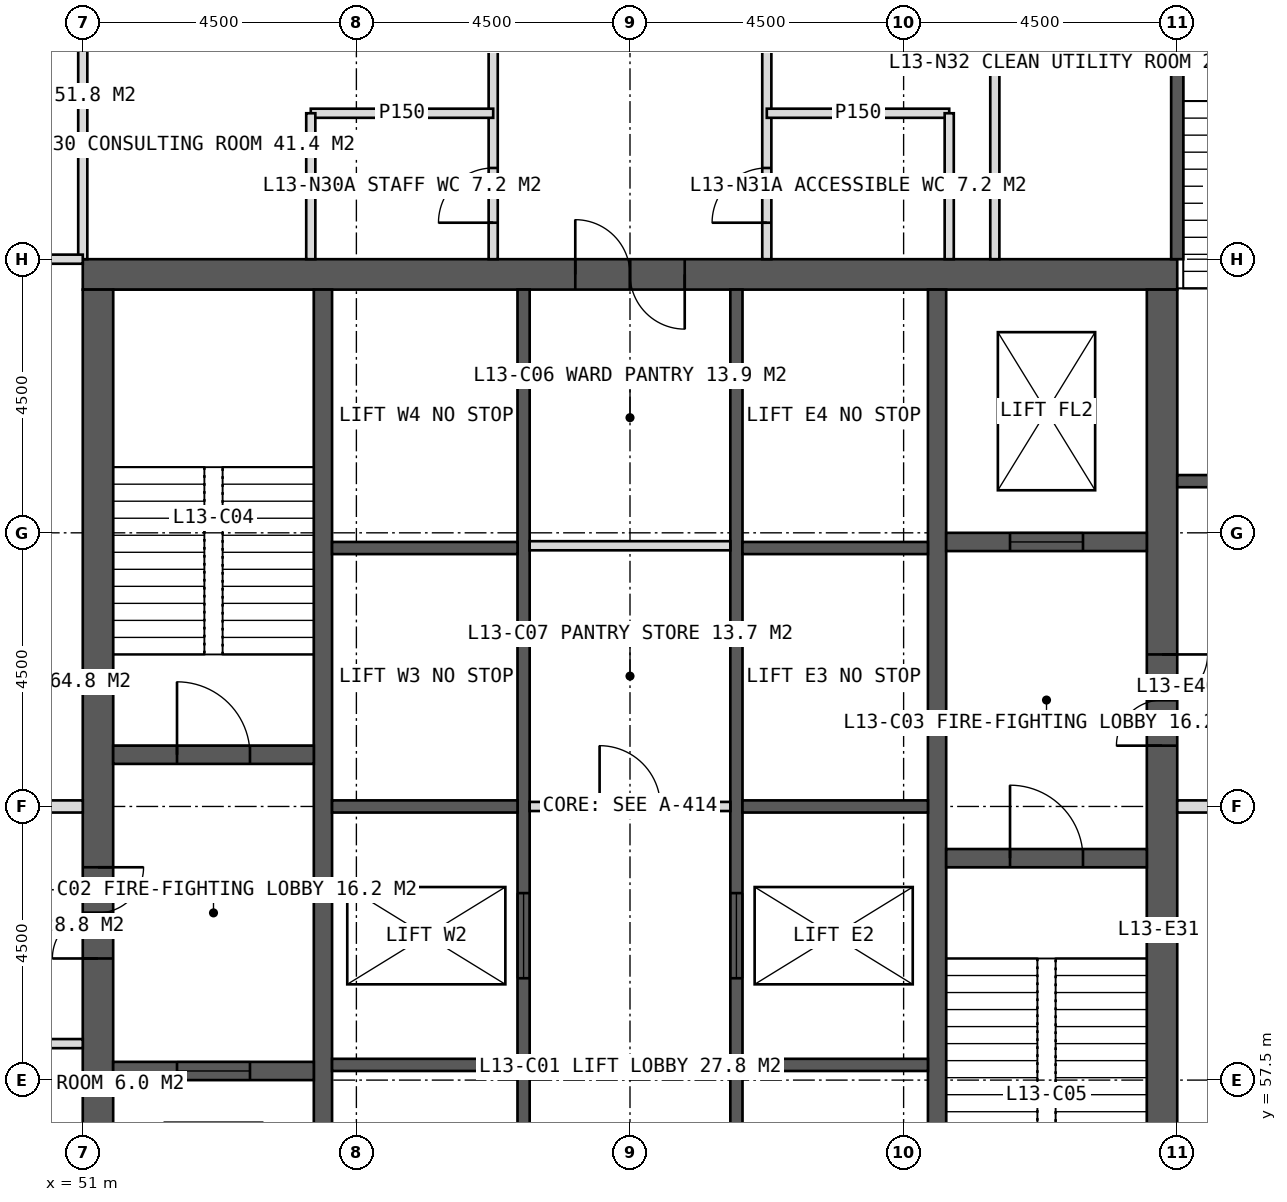
"""IFC4 building model, lengths in metres.
Left out: names, types, materials, properties, quantities, classifications, styles, units other than length and angle.
Written with IfcOpenShell. Run it as: python <this file> out.ifc"""

import sys

from ifc_helpers import new_model, si_unit, direction, frame, frame_2d, origin, place, context, subcontext, project, spatial, rectangle, extrude, element, fill, save


model = new_model("IFC4")
c1 = context("Model", 3, precision=1e-05, world=origin(), true_north=direction((0.0, 1.0)))
c2 = subcontext(c1, "Body", "Model", "MODEL_VIEW")
j1 = project(units=[si_unit("LENGTHUNIT", "METRE"), si_unit("PLANEANGLEUNIT", "RADIAN")], contexts=[c1])
p1 = place(None, origin())
s1 = spatial("IfcSite", under=j1, at=p1, CompositionType="ELEMENT")
p2 = place(p1, origin())
s2 = spatial("IfcBuilding", under=s1, at=p2, CompositionType="ELEMENT")
p3 = place(p2, frame((0.0, 0.0, 59.0)))
s3 = spatial("IfcBuildingStorey", under=s2, at=p3, CompositionType="ELEMENT", Elevation=59.0)
p4 = place(p3, frame((51.0, 70.75, 0.0), z_axis=(0.0, 0.0, 1.0), x_axis=(1.0, 0.0, 0.0)))
e1 = element("IfcWall", 1, at=p4, inside=s3, PredefinedType="SHEAR", context=c2, shape_type="SweptSolid", body=[
    extrude(rectangle(XDim=18.0, YDim=0.5, at=frame_2d((9.0, 0.0))), origin(), (0.0, 0.0, 1.0), 4.0),
])
p5 = place(p4, frame((8.1, 0.0, 0.0)))
e2 = element("IfcOpeningElement", 2, at=p5, cuts=e1, PredefinedType="OPENING", context=c2, shape_type="SweptSolid", body=[
    extrude(rectangle(XDim=1.8, YDim=2.2, at=frame_2d((0.9, 1.1))), frame((0.0, 0.26, 0.0), z_axis=(0.0, -1.0, 0.0), x_axis=(1.0, 0.0, 0.0)), (0.0, 0.0, 1.0), 0.52),
])
p6 = place(p3, frame((51.25, 53.5, 0.0), z_axis=(0.0, 0.0, 1.0), x_axis=(0.0, 1.0, 0.0)))
e3 = element("IfcWall", 3, at=p6, inside=s3, PredefinedType="SHEAR", context=c2, shape_type="SweptSolid", body=[
    extrude(rectangle(XDim=17.0, YDim=0.5, at=frame_2d((8.5, 0.0))), origin(), (0.0, 0.0, 1.0), 4.0),
])
p7 = place(p6, frame((6.0, 0.0, 0.0)))
e4 = element("IfcOpeningElement", 4, at=p7, cuts=e3, PredefinedType="OPENING", context=c2, shape_type="SweptSolid", body=[
    extrude(rectangle(XDim=1.5, YDim=2.2, at=frame_2d((0.75, 1.1))), frame((0.0, 0.26, 0.0), z_axis=(0.0, -1.0, 0.0), x_axis=(1.0, 0.0, 0.0)), (0.0, 0.0, 1.0), 0.52),
])
p8 = place(p3, frame((68.75, 53.5, 0.0), z_axis=(0.0, 0.0, 1.0), x_axis=(0.0, 1.0, 0.0)))
e5 = element("IfcWall", 5, at=p8, inside=s3, PredefinedType="SHEAR", context=c2, shape_type="SweptSolid", body=[
    extrude(rectangle(XDim=17.0, YDim=0.5, at=frame_2d((8.5, 0.0))), origin(), (0.0, 0.0, 1.0), 4.0),
])
p9 = place(p8, frame((9.5, 0.0, 0.0)))
e6 = element("IfcOpeningElement", 6, at=p9, cuts=e5, PredefinedType="OPENING", context=c2, shape_type="SweptSolid", body=[
    extrude(rectangle(XDim=1.5, YDim=2.2, at=frame_2d((0.75, 1.1))), frame((0.0, 0.26, 0.0), z_axis=(0.0, -1.0, 0.0), x_axis=(1.0, 0.0, 0.0)), (0.0, 0.0, 1.0), 0.52),
])
for number, where, z_axis, x_axis in (
    (7, (54.95, 53.5, 0.0), (0.0, 0.0, 1.0), (0.0, 1.0, 0.0)),
    (8, (65.05, 53.5, 0.0), (0.0, 0.0, 1.0), (0.0, 1.0, 0.0)),
):
    element("IfcWall", number, at=place(p3, frame(where, z_axis=z_axis, x_axis=x_axis)), inside=s3, PredefinedType="SHEAR", context=c2, shape_type="SweptSolid", body=[
        extrude(rectangle(XDim=17.0, YDim=0.3, at=frame_2d((8.5, 0.0))), origin(), (0.0, 0.0, 1.0), 4.0),
    ])
p10 = place(p3, frame((58.25, 53.5, 0.0), z_axis=(0.0, 0.0, 1.0), x_axis=(0.0, 1.0, 0.0)))
e9 = element("IfcWall", 9, at=p10, inside=s3, PredefinedType="SHEAR", context=c2, shape_type="SweptSolid", body=[
    extrude(rectangle(XDim=17.0, YDim=0.2, at=frame_2d((8.5, 0.0))), origin(), (0.0, 0.0, 1.0), 4.0),
])
p11 = place(p10, frame((1.375, 0.0, 0.0)))
e10 = element("IfcOpeningElement", 10, at=p11, cuts=e9, PredefinedType="OPENING", context=c2, shape_type="SweptSolid", body=[
    extrude(rectangle(XDim=1.4, YDim=2.2, at=frame_2d((0.7, 1.1))), frame((0.0, 0.11, 0.0), z_axis=(0.0, -1.0, 0.0), x_axis=(1.0, 0.0, 0.0)), (0.0, 0.0, 1.0), 0.22),
])
p12 = place(p10, frame((5.675, 0.0, 0.0)))
e11 = element("IfcOpeningElement", 11, at=p12, cuts=e9, PredefinedType="OPENING", context=c2, shape_type="SweptSolid", body=[
    extrude(rectangle(XDim=1.4, YDim=2.2, at=frame_2d((0.7, 1.1))), frame((0.0, 0.11, 0.0), z_axis=(0.0, -1.0, 0.0), x_axis=(1.0, 0.0, 0.0)), (0.0, 0.0, 1.0), 0.22),
])
p13 = place(p3, frame((61.75, 53.5, 0.0), z_axis=(0.0, 0.0, 1.0), x_axis=(0.0, 1.0, 0.0)))
e12 = element("IfcWall", 12, at=p13, inside=s3, PredefinedType="SHEAR", context=c2, shape_type="SweptSolid", body=[
    extrude(rectangle(XDim=17.0, YDim=0.2, at=frame_2d((8.5, 0.0))), origin(), (0.0, 0.0, 1.0), 4.0),
])
p14 = place(p13, frame((1.375, 0.0, 0.0)))
e13 = element("IfcOpeningElement", 13, at=p14, cuts=e12, PredefinedType="OPENING", context=c2, shape_type="SweptSolid", body=[
    extrude(rectangle(XDim=1.4, YDim=2.2, at=frame_2d((0.7, 1.1))), frame((0.0, 0.11, 0.0), z_axis=(0.0, -1.0, 0.0), x_axis=(1.0, 0.0, 0.0)), (0.0, 0.0, 1.0), 0.22),
])
p15 = place(p13, frame((5.675, 0.0, 0.0)))
e14 = element("IfcOpeningElement", 14, at=p15, cuts=e12, PredefinedType="OPENING", context=c2, shape_type="SweptSolid", body=[
    extrude(rectangle(XDim=1.4, YDim=2.2, at=frame_2d((0.7, 1.1))), frame((0.0, 0.11, 0.0), z_axis=(0.0, -1.0, 0.0), x_axis=(1.0, 0.0, 0.0)), (0.0, 0.0, 1.0), 0.22),
])
for number, where, z_axis, x_axis in (
    (15, (55.1, 57.75, 0.0), (0.0, 0.0, 1.0), (1.0, 0.0, 0.0)),
    (16, (61.85, 57.75, 0.0), (0.0, 0.0, 1.0), (1.0, 0.0, 0.0)),
    (17, (55.1, 62.0, 0.0), (0.0, 0.0, 1.0), (1.0, 0.0, 0.0)),
    (18, (61.85, 62.0, 0.0), (0.0, 0.0, 1.0), (1.0, 0.0, 0.0)),
    (19, (55.1, 66.25, 0.0), (0.0, 0.0, 1.0), (1.0, 0.0, 0.0)),
    (20, (61.85, 66.25, 0.0), (0.0, 0.0, 1.0), (1.0, 0.0, 0.0)),
):
    element("IfcWall", number, at=place(p3, frame(where, z_axis=z_axis, x_axis=x_axis)), inside=s3, PredefinedType="SHEAR", context=c2, shape_type="SweptSolid", body=[
        extrude(rectangle(XDim=3.05, YDim=0.2, at=frame_2d((1.525, 0.0))), origin(), (0.0, 0.0, 1.0), 4.0),
    ])
p16 = place(p3, frame((51.5, 62.85, 0.0), z_axis=(0.0, 0.0, 1.0), x_axis=(1.0, 0.0, 0.0)))
e21 = element("IfcWall", 21, at=p16, inside=s3, PredefinedType="SHEAR", context=c2, shape_type="SweptSolid", body=[
    extrude(rectangle(XDim=3.3, YDim=0.3, at=frame_2d((1.65, 0.0))), origin(), (0.0, 0.0, 1.0), 4.0),
])
p17 = place(p16, frame((1.05, 0.0, 0.0)))
e22 = element("IfcOpeningElement", 22, at=p17, cuts=e21, PredefinedType="OPENING", context=c2, shape_type="SweptSolid", body=[
    extrude(rectangle(XDim=1.2, YDim=2.1, at=frame_2d((0.6, 1.05))), frame((0.0, 0.16, 0.0), z_axis=(0.0, -1.0, 0.0), x_axis=(1.0, 0.0, 0.0)), (0.0, 0.0, 1.0), 0.32),
])
p18 = place(p3, frame((51.5, 57.65, 0.0), z_axis=(0.0, 0.0, 1.0), x_axis=(1.0, 0.0, 0.0)))
e23 = element("IfcWall", 23, at=p18, inside=s3, PredefinedType="SHEAR", context=c2, shape_type="SweptSolid", body=[
    extrude(rectangle(XDim=3.3, YDim=0.3, at=frame_2d((1.65, 0.0))), origin(), (0.0, 0.0, 1.0), 4.0),
])
p19 = place(p18, frame((1.05, 0.0, 0.0)))
e24 = element("IfcOpeningElement", 24, at=p19, cuts=e23, PredefinedType="OPENING", context=c2, shape_type="SweptSolid", body=[
    extrude(rectangle(XDim=1.2, YDim=2.2, at=frame_2d((0.6, 1.1))), frame((0.0, 0.16, 0.0), z_axis=(0.0, -1.0, 0.0), x_axis=(1.0, 0.0, 0.0)), (0.0, 0.0, 1.0), 0.32),
])
p20 = place(p3, frame((65.2, 61.15, 0.0), z_axis=(0.0, 0.0, 1.0), x_axis=(1.0, 0.0, 0.0)))
e25 = element("IfcWall", 25, at=p20, inside=s3, PredefinedType="SHEAR", context=c2, shape_type="SweptSolid", body=[
    extrude(rectangle(XDim=3.3, YDim=0.3, at=frame_2d((1.65, 0.0))), origin(), (0.0, 0.0, 1.0), 4.0),
])
p21 = place(p20, frame((1.05, 0.0, 0.0)))
e26 = element("IfcOpeningElement", 26, at=p21, cuts=e25, PredefinedType="OPENING", context=c2, shape_type="SweptSolid", body=[
    extrude(rectangle(XDim=1.2, YDim=2.1, at=frame_2d((0.6, 1.05))), frame((0.0, 0.16, 0.0), z_axis=(0.0, -1.0, 0.0), x_axis=(1.0, 0.0, 0.0)), (0.0, 0.0, 1.0), 0.32),
])
p22 = place(p3, frame((65.2, 66.35, 0.0), z_axis=(0.0, 0.0, 1.0), x_axis=(1.0, 0.0, 0.0)))
e27 = element("IfcWall", 27, at=p22, inside=s3, PredefinedType="SHEAR", context=c2, shape_type="SweptSolid", body=[
    extrude(rectangle(XDim=3.3, YDim=0.3, at=frame_2d((1.65, 0.0))), origin(), (0.0, 0.0, 1.0), 4.0),
])
p23 = place(p22, frame((1.05, 0.0, 0.0)))
e28 = element("IfcOpeningElement", 28, at=p23, cuts=e27, PredefinedType="OPENING", context=c2, shape_type="SweptSolid", body=[
    extrude(rectangle(XDim=1.2, YDim=2.2, at=frame_2d((0.6, 1.1))), frame((0.0, 0.16, 0.0), z_axis=(0.0, -1.0, 0.0), x_axis=(1.0, 0.0, 0.0)), (0.0, 0.0, 1.0), 0.32),
])
p24 = place(p3, frame((51.0, 71.0, 0.0), z_axis=(0.0, 0.0, 1.0), x_axis=(0.0, 1.0, 0.0)))
e29 = element("IfcWall", 29, at=p24, inside=s3, PredefinedType="PARTITIONING", context=c2, shape_type="SweptSolid", body=[
    extrude(rectangle(XDim=7.2, YDim=0.15, at=frame_2d((3.6, 0.0))), origin(), (0.0, 0.0, 1.0), 3.75),
])
p25 = place(p3, frame((57.75, 71.0, 0.0), z_axis=(0.0, 0.0, 1.0), x_axis=(0.0, 1.0, 0.0)))
e30 = element("IfcWall", 30, at=p25, inside=s3, PredefinedType="PARTITIONING", context=c2, shape_type="SweptSolid", body=[
    extrude(rectangle(XDim=7.2, YDim=0.15, at=frame_2d((3.6, 0.0))), origin(), (0.0, 0.0, 1.0), 3.75),
])
p26 = place(p25, frame((0.6, 0.0, 0.0)))
e31 = element("IfcOpeningElement", 31, at=p26, cuts=e30, PredefinedType="OPENING", context=c2, shape_type="SweptSolid", body=[
    extrude(rectangle(XDim=0.9, YDim=2.1, at=frame_2d((0.45, 1.05))), frame((0.0, 0.085, 0.0), z_axis=(0.0, -1.0, 0.0), x_axis=(1.0, 0.0, 0.0)), (0.0, 0.0, 1.0), 0.17),
])
p27 = place(p3, frame((62.25, 71.0, 0.0), z_axis=(0.0, 0.0, 1.0), x_axis=(0.0, 1.0, 0.0)))
e32 = element("IfcWall", 32, at=p27, inside=s3, PredefinedType="PARTITIONING", context=c2, shape_type="SweptSolid", body=[
    extrude(rectangle(XDim=7.2, YDim=0.15, at=frame_2d((3.6, 0.0))), origin(), (0.0, 0.0, 1.0), 3.75),
])
p28 = place(p27, frame((0.6, 0.0, 0.0)))
e33 = element("IfcOpeningElement", 33, at=p28, cuts=e32, PredefinedType="OPENING", context=c2, shape_type="SweptSolid", body=[
    extrude(rectangle(XDim=0.9, YDim=2.1, at=frame_2d((0.45, 1.05))), frame((0.0, 0.085, 0.0), z_axis=(0.0, -1.0, 0.0), x_axis=(1.0, 0.0, 0.0)), (0.0, 0.0, 1.0), 0.17),
])
p29 = place(p3, frame((66.0, 71.0, 0.0), z_axis=(0.0, 0.0, 1.0), x_axis=(0.0, 1.0, 0.0)))
e34 = element("IfcWall", 34, at=p29, inside=s3, PredefinedType="PARTITIONING", context=c2, shape_type="SweptSolid", body=[
    extrude(rectangle(XDim=7.2, YDim=0.15, at=frame_2d((3.6, 0.0))), origin(), (0.0, 0.0, 1.0), 3.75),
])
p30 = place(p3, frame((54.75, 73.4, 0.0), z_axis=(0.0, 0.0, 1.0), x_axis=(1.0, 0.0, 0.0)))
e35 = element("IfcWall", 35, at=p30, inside=s3, PredefinedType="PARTITIONING", context=c2, shape_type="SweptSolid", body=[
    extrude(rectangle(XDim=3.0, YDim=0.15, at=frame_2d((1.5, 0.0))), origin(), (0.0, 0.0, 1.0), 3.75),
])
p31 = place(p3, frame((54.75, 71.0, 0.0), z_axis=(0.0, 0.0, 1.0), x_axis=(0.0, 1.0, 0.0)))
e36 = element("IfcWall", 36, at=p31, inside=s3, PredefinedType="PARTITIONING", context=c2, shape_type="SweptSolid", body=[
    extrude(rectangle(XDim=2.4, YDim=0.15, at=frame_2d((1.2, 0.0))), origin(), (0.0, 0.0, 1.0), 3.75),
])
p32 = place(p3, frame((62.25, 73.4, 0.0), z_axis=(0.0, 0.0, 1.0), x_axis=(1.0, 0.0, 0.0)))
e37 = element("IfcWall", 37, at=p32, inside=s3, PredefinedType="PARTITIONING", context=c2, shape_type="SweptSolid", body=[
    extrude(rectangle(XDim=3.0, YDim=0.15, at=frame_2d((1.5, 0.0))), origin(), (0.0, 0.0, 1.0), 3.75),
])
p33 = place(p3, frame((65.25, 71.0, 0.0), z_axis=(0.0, 0.0, 1.0), x_axis=(0.0, 1.0, 0.0)))
e38 = element("IfcWall", 38, at=p33, inside=s3, PredefinedType="PARTITIONING", context=c2, shape_type="SweptSolid", body=[
    extrude(rectangle(XDim=2.4, YDim=0.15, at=frame_2d((1.2, 0.0))), origin(), (0.0, 0.0, 1.0), 3.75),
])
p34 = place(p3, frame((51.0, 58.1, 0.0), z_axis=(0.0, 0.0, 1.0), x_axis=(-1.0, 0.0, 0.0)))
e39 = element("IfcWall", 39, at=p34, inside=s3, PredefinedType="PARTITIONING", context=c2, shape_type="SweptSolid", body=[
    extrude(rectangle(XDim=7.2, YDim=0.15, at=frame_2d((3.6, 0.0))), origin(), (0.0, 0.0, 1.0), 3.75),
])
p35 = place(p34, frame((0.6, 0.0, 0.0)))
e40 = element("IfcOpeningElement", 40, at=p35, cuts=e39, PredefinedType="OPENING", context=c2, shape_type="SweptSolid", body=[
    extrude(rectangle(XDim=0.9, YDim=2.1, at=frame_2d((0.45, 1.05))), frame((0.0, 0.085, 0.0), z_axis=(0.0, -1.0, 0.0), x_axis=(1.0, 0.0, 0.0)), (0.0, 0.0, 1.0), 0.17),
])
p36 = place(p3, frame((51.0, 62.0, 0.0), z_axis=(0.0, 0.0, 1.0), x_axis=(-1.0, 0.0, 0.0)))
e41 = element("IfcWall", 41, at=p36, inside=s3, PredefinedType="SOLIDWALL", context=c2, shape_type="SweptSolid", body=[
    extrude(rectangle(XDim=7.2, YDim=0.2, at=frame_2d((3.6, 0.0))), origin(), (0.0, 0.0, 1.0), 2.75),
])
p37 = place(p3, frame((51.0, 71.0, 0.0), z_axis=(0.0, 0.0, 1.0), x_axis=(-1.0, 0.0, 0.0)))
e42 = element("IfcWall", 42, at=p37, inside=s3, PredefinedType="PARTITIONING", context=c2, shape_type="SweptSolid", body=[
    extrude(rectangle(XDim=7.2, YDim=0.15, at=frame_2d((3.6, 0.0))), origin(), (0.0, 0.0, 1.0), 3.75),
])
p38 = place(p3, frame((69.0, 62.0, 0.0), z_axis=(0.0, 0.0, 1.0), x_axis=(1.0, 0.0, 0.0)))
e43 = element("IfcWall", 43, at=p38, inside=s3, PredefinedType="SOLIDWALL", context=c2, shape_type="SweptSolid", body=[
    extrude(rectangle(XDim=7.2, YDim=0.2, at=frame_2d((3.6, 0.0))), origin(), (0.0, 0.0, 1.0), 2.75),
])
p39 = place(p3, frame((58.35, 62.0, 0.0), z_axis=(0.0, 0.0, 1.0), x_axis=(1.0, 0.0, 0.0)))
e44 = element("IfcWall", 44, at=p39, inside=s3, PredefinedType="PARTITIONING", context=c2, shape_type="SweptSolid", body=[
    extrude(rectangle(XDim=3.3, YDim=0.15, at=frame_2d((1.65, 0.0))), origin(), (0.0, 0.0, 1.0), 3.75),
])
p40 = place(p39, frame((1.15, 0.0, 0.0)))
e45 = element("IfcOpeningElement", 45, at=p40, cuts=e44, PredefinedType="OPENING", context=c2, shape_type="SweptSolid", body=[
    extrude(rectangle(XDim=1.0, YDim=2.1, at=frame_2d((0.5, 1.05))), frame((0.0, 0.085, 0.0), z_axis=(0.0, -1.0, 0.0), x_axis=(1.0, 0.0, 0.0)), (0.0, 0.0, 1.0), 0.17),
])
p41 = place(p3, frame((58.35, 66.288, 0.0), z_axis=(0.0, 0.0, 1.0), x_axis=(1.0, 0.0, 0.0)))
e46 = element("IfcWall", 46, at=p41, inside=s3, PredefinedType="PARTITIONING", context=c2, shape_type="SweptSolid", body=[
    extrude(rectangle(XDim=3.3, YDim=0.15, at=frame_2d((1.65, 0.0))), origin(), (0.0, 0.0, 1.0), 3.75),
])
p42 = place(p3, frame((69.0, 71.0, 0.0), z_axis=(0.0, 0.0, 1.0), x_axis=(0.0, 1.0, 0.0)))
e47 = element("IfcWall", 47, at=p42, inside=s3, PredefinedType="SOLIDWALL", context=c2, shape_type="SweptSolid", body=[
    extrude(rectangle(XDim=4.1, YDim=0.2, at=frame_2d((2.05, 0.0))), origin(), (0.0, 0.0, 1.0), 3.75),
])
p43 = place(p3, frame((69.0, 67.35, 0.0), z_axis=(0.0, 0.0, 1.0), x_axis=(1.0, 0.0, 0.0)))
e48 = element("IfcWall", 48, at=p43, inside=s3, PredefinedType="SOLIDWALL", context=c2, shape_type="SweptSolid", body=[
    extrude(rectangle(XDim=3.5, YDim=0.2, at=frame_2d((1.75, 0.0))), origin(), (0.0, 0.0, 1.0), 3.75),
])
p44 = place(p26, origin())
e49 = element("IfcDoor", 49, at=p44, inside=s3, OperationType="SINGLE_SWING_LEFT", PredefinedType="DOOR", context=c2, shape_type="SweptSolid", body=[
    extrude(rectangle(XDim=0.9, YDim=2.1, at=frame_2d((0.45, 1.05))), frame((0.0, 0.025, 0.0), z_axis=(0.0, -1.0, 0.0), x_axis=(1.0, 0.0, 0.0)), (0.0, 0.0, 1.0), 0.05),
])
fill(e31, e49)
p45 = place(p28, origin())
e50 = element("IfcDoor", 50, at=p45, inside=s3, OperationType="SINGLE_SWING_LEFT", PredefinedType="DOOR", context=c2, shape_type="SweptSolid", body=[
    extrude(rectangle(XDim=0.9, YDim=2.1, at=frame_2d((0.45, 1.05))), frame((0.0, 0.025, 0.0), z_axis=(0.0, -1.0, 0.0), x_axis=(1.0, 0.0, 0.0)), (0.0, 0.0, 1.0), 0.05),
])
fill(e33, e50)
p46 = place(p7, origin())
e51 = element("IfcDoor", 51, at=p46, inside=s3, OperationType="DOUBLE_DOOR_SINGLE_SWING", PredefinedType="DOOR", context=c2, shape_type="SweptSolid", body=[
    extrude(rectangle(XDim=1.5, YDim=2.2, at=frame_2d((0.75, 1.1))), frame((0.0, 0.025, 0.0), z_axis=(0.0, -1.0, 0.0), x_axis=(1.0, 0.0, 0.0)), (0.0, 0.0, 1.0), 0.05),
])
fill(e4, e51)
p47 = place(p9, origin())
e52 = element("IfcDoor", 52, at=p47, inside=s3, OperationType="DOUBLE_DOOR_SINGLE_SWING", PredefinedType="DOOR", context=c2, shape_type="SweptSolid", body=[
    extrude(rectangle(XDim=1.5, YDim=2.2, at=frame_2d((0.75, 1.1))), frame((0.0, 0.025, 0.0), z_axis=(0.0, -1.0, 0.0), x_axis=(1.0, 0.0, 0.0)), (0.0, 0.0, 1.0), 0.05),
])
fill(e6, e52)
p48 = place(p17, origin())
e53 = element("IfcDoor", 53, at=p48, inside=s3, OperationType="SINGLE_SWING_LEFT", PredefinedType="DOOR", context=c2, shape_type="SweptSolid", body=[
    extrude(rectangle(XDim=1.2, YDim=2.1, at=frame_2d((0.6, 1.05))), frame((0.0, 0.025, 0.0), z_axis=(0.0, -1.0, 0.0), x_axis=(1.0, 0.0, 0.0)), (0.0, 0.0, 1.0), 0.05),
])
fill(e22, e53)
p49 = place(p21, origin())
e54 = element("IfcDoor", 54, at=p49, inside=s3, OperationType="SINGLE_SWING_LEFT", PredefinedType="DOOR", context=c2, shape_type="SweptSolid", body=[
    extrude(rectangle(XDim=1.2, YDim=2.1, at=frame_2d((0.6, 1.05))), frame((0.0, 0.025, 0.0), z_axis=(0.0, -1.0, 0.0), x_axis=(1.0, 0.0, 0.0)), (0.0, 0.0, 1.0), 0.05),
])
fill(e26, e54)
p50 = place(p19, origin())
e55 = element("IfcDoor", 55, at=p50, inside=s3, OperationType="SLIDING_TO_LEFT", PredefinedType="DOOR", context=c2, shape_type="SweptSolid", body=[
    extrude(rectangle(XDim=1.2, YDim=2.2, at=frame_2d((0.6, 1.1))), frame((0.0, 0.025, 0.0), z_axis=(0.0, -1.0, 0.0), x_axis=(1.0, 0.0, 0.0)), (0.0, 0.0, 1.0), 0.05),
])
fill(e24, e55)
p51 = place(p23, origin())
e56 = element("IfcDoor", 56, at=p51, inside=s3, OperationType="SLIDING_TO_LEFT", PredefinedType="DOOR", context=c2, shape_type="SweptSolid", body=[
    extrude(rectangle(XDim=1.2, YDim=2.2, at=frame_2d((0.6, 1.1))), frame((0.0, 0.025, 0.0), z_axis=(0.0, -1.0, 0.0), x_axis=(1.0, 0.0, 0.0)), (0.0, 0.0, 1.0), 0.05),
])
fill(e28, e56)
p52 = place(p12, origin())
e57 = element("IfcDoor", 57, at=p52, inside=s3, OperationType="SLIDING_TO_LEFT", PredefinedType="DOOR", context=c2, shape_type="SweptSolid", body=[
    extrude(rectangle(XDim=1.4, YDim=2.2, at=frame_2d((0.7, 1.1))), frame((0.0, 0.025, 0.0), z_axis=(0.0, -1.0, 0.0), x_axis=(1.0, 0.0, 0.0)), (0.0, 0.0, 1.0), 0.05),
])
fill(e11, e57)
p53 = place(p15, origin())
e58 = element("IfcDoor", 58, at=p53, inside=s3, OperationType="SLIDING_TO_LEFT", PredefinedType="DOOR", context=c2, shape_type="SweptSolid", body=[
    extrude(rectangle(XDim=1.4, YDim=2.2, at=frame_2d((0.7, 1.1))), frame((0.0, 0.025, 0.0), z_axis=(0.0, -1.0, 0.0), x_axis=(1.0, 0.0, 0.0)), (0.0, 0.0, 1.0), 0.05),
])
fill(e14, e58)
p54 = place(p40, origin())
e59 = element("IfcDoor", 59, at=p54, inside=s3, OperationType="SINGLE_SWING_LEFT", PredefinedType="DOOR", context=c2, shape_type="SweptSolid", body=[
    extrude(rectangle(XDim=1.0, YDim=2.1, at=frame_2d((0.5, 1.05))), frame((0.0, 0.025, 0.0), z_axis=(0.0, -1.0, 0.0), x_axis=(1.0, 0.0, 0.0)), (0.0, 0.0, 1.0), 0.05),
])
fill(e45, e59)
p55 = place(p5, origin())
e60 = element("IfcDoor", 60, at=p55, inside=s3, OperationType="DOUBLE_DOOR_SINGLE_SWING", PredefinedType="DOOR", context=c2, shape_type="SweptSolid", body=[
    extrude(rectangle(XDim=1.8, YDim=2.2, at=frame_2d((0.9, 1.1))), frame((0.0, 0.025, 0.0), z_axis=(0.0, -1.0, 0.0), x_axis=(1.0, 0.0, 0.0)), (0.0, 0.0, 1.0), 0.05),
])
fill(e2, e60)
save(model, sys.argv[1])
